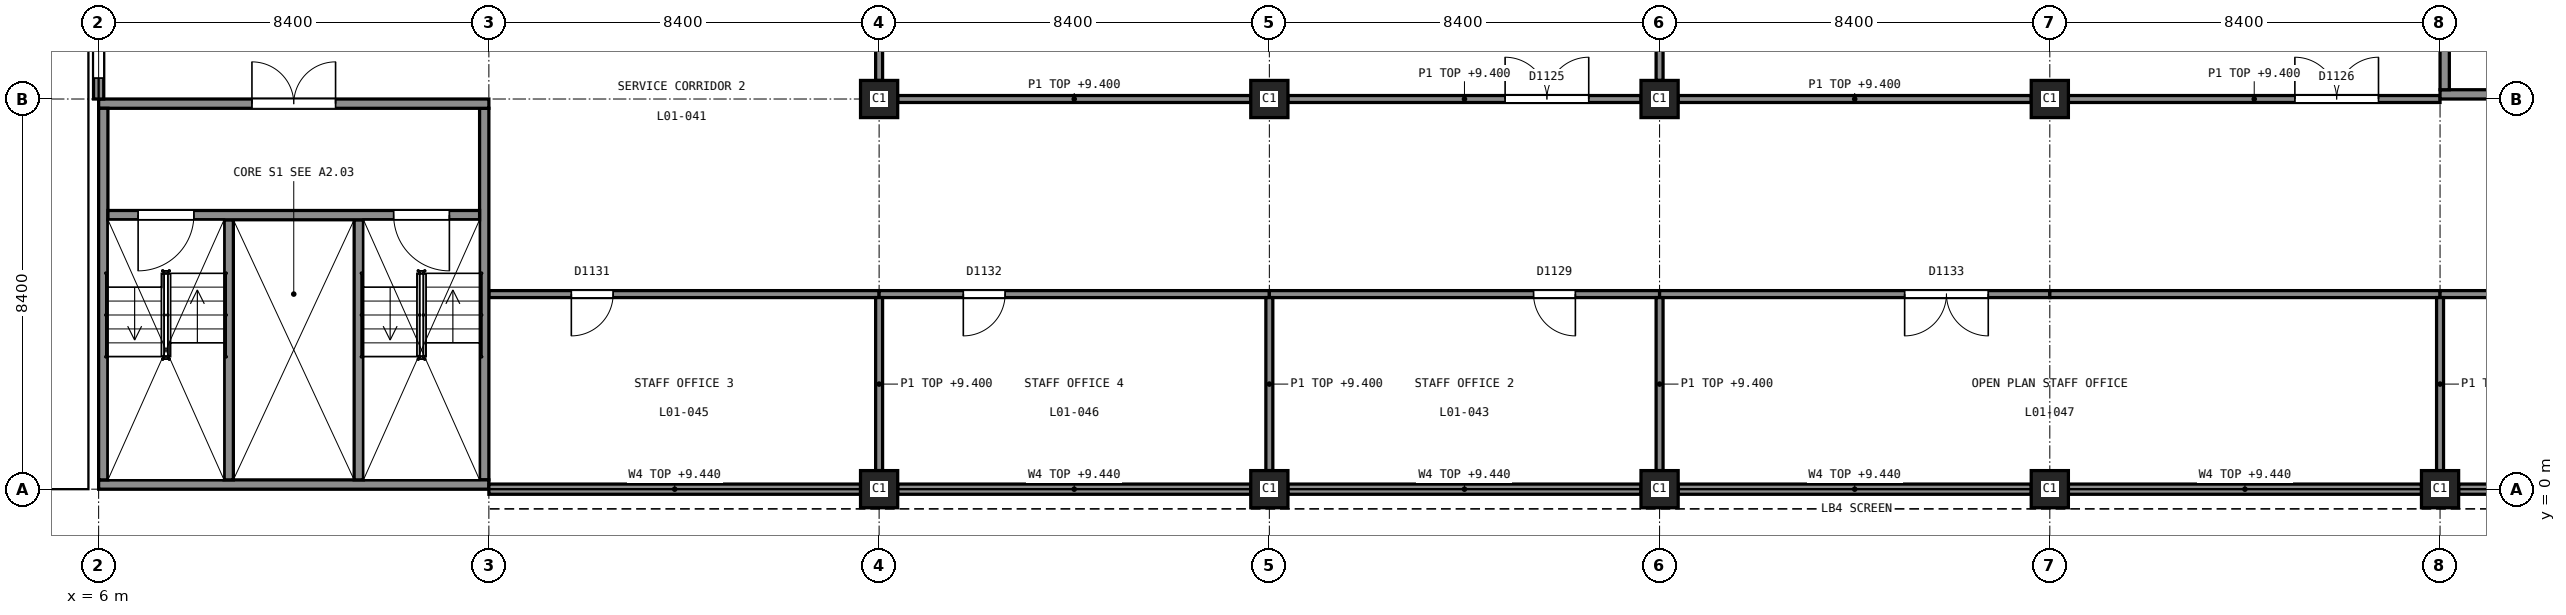
"""IFC4 building model, lengths in metres.
Left out: names, types, materials, properties, quantities, classifications, styles, units other than length and angle.
Written with IfcOpenShell. Run it as: python <this file> out.ifc"""

import sys

from ifc_helpers import new_model, si_unit, direction, frame, frame_2d, origin, origin_2d, place, context, subcontext, project, spatial, rectangle, extrude, element, fill, save


model = new_model("IFC4")
c1 = context("Model", 3, precision=1e-05, world=origin(), true_north=direction((0.0, 1.0)))
c2 = subcontext(c1, "Body", "Model", "MODEL_VIEW")
j1 = project(units=[si_unit("LENGTHUNIT", "METRE"), si_unit("PLANEANGLEUNIT", "RADIAN")], contexts=[c1])
p1 = place(None, origin())
s1 = spatial("IfcSite", under=j1, at=p1, CompositionType="ELEMENT")
p2 = place(p1, origin())
s2 = spatial("IfcBuilding", under=s1, at=p2, CompositionType="ELEMENT")
p3 = place(p2, frame((0.0, 0.0, 5.5)))
s3 = spatial("IfcBuildingStorey", under=s2, at=p3, CompositionType="ELEMENT", Elevation=5.5)
p4 = place(p3, frame((6.0, 0.1, 0.0), z_axis=(0.0, 0.0, 1.0), x_axis=(1.0, 0.0, 0.0)))
e1 = element("IfcWall", 1, at=p4, inside=s3, PredefinedType="SHEAR", context=c2, shape_type="SweptSolid", body=[
    extrude(rectangle(XDim=8.4, YDim=0.2, at=frame_2d((4.2, 0.0))), origin(), (0.0, 0.0, 1.0), 5.0),
])
p5 = place(p3, frame((6.0, 8.3, 0.0), z_axis=(0.0, 0.0, 1.0), x_axis=(1.0, 0.0, 0.0)))
e2 = element("IfcWall", 2, at=p5, inside=s3, PredefinedType="SHEAR", context=c2, shape_type="SweptSolid", body=[
    extrude(rectangle(XDim=8.4, YDim=0.2, at=frame_2d((4.2, 0.0))), origin(), (0.0, 0.0, 1.0), 5.0),
])
p6 = place(p5, frame((3.3, 0.0, 0.0)))
e3 = element("IfcOpeningElement", 3, at=p6, cuts=e2, PredefinedType="OPENING", context=c2, shape_type="SweptSolid", body=[
    extrude(rectangle(XDim=1.8, YDim=2.1, at=frame_2d((0.9, 1.05))), frame((0.0, 0.11, 0.0), z_axis=(0.0, -1.0, 0.0), x_axis=(1.0, 0.0, 0.0)), (0.0, 0.0, 1.0), 0.22),
])
for number, where, z_axis, x_axis in (
    (4, (6.1, 0.2, 0.0), (0.0, 0.0, 1.0), (0.0, 1.0, 0.0)),
    (5, (14.3, 0.2, 0.0), (0.0, 0.0, 1.0), (0.0, 1.0, 0.0)),
):
    element("IfcWall", number, at=place(p3, frame(where, z_axis=z_axis, x_axis=x_axis)), inside=s3, PredefinedType="SHEAR", context=c2, shape_type="SweptSolid", body=[
        extrude(rectangle(XDim=8.0, YDim=0.2, at=frame_2d((4.0, 0.0))), origin(), (0.0, 0.0, 1.0), 5.0),
    ])
p7 = place(p3, frame((6.2, 5.9, 0.0), z_axis=(0.0, 0.0, 1.0), x_axis=(1.0, 0.0, 0.0)))
e6 = element("IfcWall", 6, at=p7, inside=s3, PredefinedType="SHEAR", context=c2, shape_type="SweptSolid", body=[
    extrude(rectangle(XDim=8.0, YDim=0.2, at=frame_2d((4.0, 0.0))), origin(), (0.0, 0.0, 1.0), 5.0),
])
p8 = place(p7, frame((0.65, 0.0, 0.0)))
e7 = element("IfcOpeningElement", 7, at=p8, cuts=e6, PredefinedType="OPENING", context=c2, shape_type="SweptSolid", body=[
    extrude(rectangle(XDim=1.2, YDim=2.1, at=frame_2d((0.6, 1.05))), frame((0.0, 0.11, 0.0), z_axis=(0.0, -1.0, 0.0), x_axis=(1.0, 0.0, 0.0)), (0.0, 0.0, 1.0), 0.22),
])
p9 = place(p7, frame((6.15, 0.0, 0.0)))
e8 = element("IfcOpeningElement", 8, at=p9, cuts=e6, PredefinedType="OPENING", context=c2, shape_type="SweptSolid", body=[
    extrude(rectangle(XDim=1.2, YDim=2.1, at=frame_2d((0.6, 1.05))), frame((0.0, 0.11, 0.0), z_axis=(0.0, -1.0, 0.0), x_axis=(1.0, 0.0, 0.0)), (0.0, 0.0, 1.0), 0.22),
])
for number, where, z_axis, x_axis in (
    (9, (8.8, 0.2, 0.0), (0.0, 0.0, 1.0), (0.0, 1.0, 0.0)),
    (10, (11.6, 0.2, 0.0), (0.0, 0.0, 1.0), (0.0, 1.0, 0.0)),
):
    element("IfcWall", number, at=place(p3, frame(where, z_axis=z_axis, x_axis=x_axis)), inside=s3, PredefinedType="SHEAR", context=c2, shape_type="SweptSolid", body=[
        extrude(rectangle(XDim=5.6, YDim=0.2, at=frame_2d((2.8, 0.0))), origin(), (0.0, 0.0, 1.0), 5.0),
    ])
p10 = place(p3, frame((56.4, 8.5, 0.0), z_axis=(0.0, 0.0, 1.0), x_axis=(1.0, 0.0, 0.0)))
e11 = element("IfcWall", 11, at=p10, inside=s3, PredefinedType="SHEAR", context=c2, shape_type="SweptSolid", body=[
    extrude(rectangle(XDim=8.4, YDim=0.2, at=frame_2d((4.2, 0.0))), origin(), (0.0, 0.0, 1.0), 5.0),
])
p11 = place(p10, frame((3.3, 0.0, 0.0)))
e12 = element("IfcOpeningElement", 12, at=p11, cuts=e11, PredefinedType="OPENING", context=c2, shape_type="SweptSolid", body=[
    extrude(rectangle(XDim=1.8, YDim=2.1, at=frame_2d((0.9, 1.05))), frame((0.0, 0.11, 0.0), z_axis=(0.0, -1.0, 0.0), x_axis=(1.0, 0.0, 0.0)), (0.0, 0.0, 1.0), 0.22),
])
p12 = place(p3, frame((56.5, 8.6, 0.0), z_axis=(0.0, 0.0, 1.0), x_axis=(0.0, 1.0, 0.0)))
e13 = element("IfcWall", 13, at=p12, inside=s3, PredefinedType="SHEAR", context=c2, shape_type="SweptSolid", body=[
    extrude(rectangle(XDim=8.0, YDim=0.2, at=frame_2d((4.0, 0.0))), origin(), (0.0, 0.0, 1.0), 5.0),
])
for number, where, z_axis, x_axis in (
    (14, (22.8, 0.0, 0.0), (0.0, 0.0, 1.0), (1.0, 0.0, 0.0)),
    (15, (22.8, 8.4, 0.0), (0.0, 0.0, 1.0), (1.0, 0.0, 0.0)),
    (16, (31.2, 0.0, 0.0), (0.0, 0.0, 1.0), (1.0, 0.0, 0.0)),
    (17, (31.2, 8.4, 0.0), (0.0, 0.0, 1.0), (1.0, 0.0, 0.0)),
    (18, (39.6, 0.0, 0.0), (0.0, 0.0, 1.0), (1.0, 0.0, 0.0)),
    (19, (39.6, 8.4, 0.0), (0.0, 0.0, 1.0), (1.0, 0.0, 0.0)),
    (20, (48.0, 0.0, 0.0), (0.0, 0.0, 1.0), (1.0, 0.0, 0.0)),
    (21, (48.0, 8.4, 0.0), (0.0, 0.0, 1.0), (1.0, 0.0, 0.0)),
    (22, (56.4, 0.0, 0.0), (0.0, 0.0, 1.0), (1.0, 0.0, 0.0)),
):
    element("IfcColumn", number, at=place(p3, frame(where, z_axis=z_axis, x_axis=x_axis)), inside=s3, PredefinedType="COLUMN", context=c2, shape_type="SweptSolid", body=[
        extrude(rectangle(XDim=0.8, YDim=0.8, at=origin_2d()), origin(), (0.0, 0.0, 1.0), 5.0),
    ])
p13 = place(p3, frame((14.4, 0.0, 0.0), z_axis=(0.0, 0.0, 1.0), x_axis=(1.0, 0.0, 0.0)))
e23 = element("IfcWall", 23, at=p13, inside=s3, PredefinedType="SOLIDWALL", context=c2, shape_type="SweptSolid", body=[
    extrude(rectangle(XDim=8.0, YDim=0.22, at=frame_2d((4.0, 0.0))), origin(), (0.0, 0.0, 1.0), 3.94),
])
p14 = place(p3, frame((23.2, 0.0, 0.0), z_axis=(0.0, 0.0, 1.0), x_axis=(1.0, 0.0, 0.0)))
e24 = element("IfcWall", 24, at=p14, inside=s3, PredefinedType="SOLIDWALL", context=c2, shape_type="SweptSolid", body=[
    extrude(rectangle(XDim=7.6, YDim=0.22, at=frame_2d((3.8, 0.0))), origin(), (0.0, 0.0, 1.0), 3.94),
])
p15 = place(p3, frame((31.6, 0.0, 0.0), z_axis=(0.0, 0.0, 1.0), x_axis=(1.0, 0.0, 0.0)))
e25 = element("IfcWall", 25, at=p15, inside=s3, PredefinedType="SOLIDWALL", context=c2, shape_type="SweptSolid", body=[
    extrude(rectangle(XDim=7.6, YDim=0.22, at=frame_2d((3.8, 0.0))), origin(), (0.0, 0.0, 1.0), 3.94),
])
for number, where, z_axis, x_axis in (
    (26, (40.0, 0.0, 0.0), (0.0, 0.0, 1.0), (1.0, 0.0, 0.0)),
    (27, (48.4, 0.0, 0.0), (0.0, 0.0, 1.0), (1.0, 0.0, 0.0)),
):
    element("IfcWall", number, at=place(p3, frame(where, z_axis=z_axis, x_axis=x_axis)), inside=s3, PredefinedType="SOLIDWALL", context=c2, shape_type="SweptSolid", body=[
        extrude(rectangle(XDim=7.6, YDim=0.22, at=frame_2d((3.8, 0.0))), origin(), (0.0, 0.0, 1.0), 3.94),
    ])
p16 = place(p3, frame((56.8, 0.0, 0.0), z_axis=(0.0, 0.0, 1.0), x_axis=(1.0, 0.0, 0.0)))
e28 = element("IfcWall", 28, at=p16, inside=s3, PredefinedType="SOLIDWALL", context=c2, shape_type="SweptSolid", body=[
    extrude(rectangle(XDim=7.6, YDim=0.22, at=frame_2d((3.8, 0.0))), origin(), (0.0, 0.0, 1.0), 3.94),
])
p17 = place(p3, frame((6.0, 8.4, 0.0), z_axis=(0.0, 0.0, 1.0), x_axis=(0.0, 1.0, 0.0)))
e29 = element("IfcWall", 29, at=p17, inside=s3, PredefinedType="SOLIDWALL", context=c2, shape_type="SweptSolid", body=[
    extrude(rectangle(XDim=8.0, YDim=0.22, at=frame_2d((4.0, 0.0))), origin(), (0.0, 0.0, 1.0), 3.94),
])
p18 = place(p17, frame((0.45, 0.0, 0.9)))
e30 = element("IfcOpeningElement", 30, at=p18, cuts=e29, PredefinedType="OPENING", context=c2, shape_type="SweptSolid", body=[
    extrude(rectangle(XDim=3.6, YDim=1.5, at=frame_2d((1.8, 0.75))), frame((0.0, 0.12, 0.0), z_axis=(0.0, -1.0, 0.0), x_axis=(1.0, 0.0, 0.0)), (0.0, 0.0, 1.0), 0.24),
])
p19 = place(p3, frame((39.6, 8.8, 0.0), z_axis=(0.0, 0.0, 1.0), x_axis=(0.0, 1.0, 0.0)))
e31 = element("IfcWall", 31, at=p19, inside=s3, PredefinedType="PARTITIONING", context=c2, shape_type="SweptSolid", body=[
    extrude(rectangle(XDim=7.6, YDim=0.15, at=frame_2d((3.8, 0.0))), origin(), (0.0, 0.0, 1.0), 3.9),
])
p20 = place(p3, frame((23.2, 8.4, 0.0), z_axis=(0.0, 0.0, 1.0), x_axis=(1.0, 0.0, 0.0)))
e32 = element("IfcWall", 32, at=p20, inside=s3, PredefinedType="PARTITIONING", context=c2, shape_type="SweptSolid", body=[
    extrude(rectangle(XDim=7.6, YDim=0.15, at=frame_2d((3.8, 0.0))), origin(), (0.0, 0.0, 1.0), 3.9),
])
p21 = place(p3, frame((31.6, 8.4, 0.0), z_axis=(0.0, 0.0, 1.0), x_axis=(1.0, 0.0, 0.0)))
e33 = element("IfcWall", 33, at=p21, inside=s3, PredefinedType="PARTITIONING", context=c2, shape_type="SweptSolid", body=[
    extrude(rectangle(XDim=7.6, YDim=0.15, at=frame_2d((3.8, 0.0))), origin(), (0.0, 0.0, 1.0), 3.9),
])
p22 = place(p21, frame((4.675, 0.0, 0.0)))
e34 = element("IfcOpeningElement", 34, at=p22, cuts=e33, PredefinedType="OPENING", context=c2, shape_type="SweptSolid", body=[
    extrude(rectangle(XDim=1.8, YDim=2.1, at=frame_2d((0.9, 1.05))), frame((0.0, 0.085, 0.0), z_axis=(0.0, -1.0, 0.0), x_axis=(1.0, 0.0, 0.0)), (0.0, 0.0, 1.0), 0.17),
])
p23 = place(p3, frame((40.0, 8.4, 0.0), z_axis=(0.0, 0.0, 1.0), x_axis=(1.0, 0.0, 0.0)))
e35 = element("IfcWall", 35, at=p23, inside=s3, PredefinedType="PARTITIONING", context=c2, shape_type="SweptSolid", body=[
    extrude(rectangle(XDim=7.6, YDim=0.15, at=frame_2d((3.8, 0.0))), origin(), (0.0, 0.0, 1.0), 3.9),
])
p24 = place(p3, frame((48.4, 8.4, 0.0), z_axis=(0.0, 0.0, 1.0), x_axis=(1.0, 0.0, 0.0)))
e36 = element("IfcWall", 36, at=p24, inside=s3, PredefinedType="PARTITIONING", context=c2, shape_type="SweptSolid", body=[
    extrude(rectangle(XDim=8.0, YDim=0.15, at=frame_2d((4.0, 0.0))), origin(), (0.0, 0.0, 1.0), 3.9),
])
p25 = place(p24, frame((4.875, 0.0, 0.0)))
e37 = element("IfcOpeningElement", 37, at=p25, cuts=e36, PredefinedType="OPENING", context=c2, shape_type="SweptSolid", body=[
    extrude(rectangle(XDim=1.8, YDim=2.1, at=frame_2d((0.9, 1.05))), frame((0.0, 0.085, 0.0), z_axis=(0.0, -1.0, 0.0), x_axis=(1.0, 0.0, 0.0)), (0.0, 0.0, 1.0), 0.17),
])
p26 = place(p3, frame((22.8, 8.8, 0.0), z_axis=(0.0, 0.0, 1.0), x_axis=(0.0, 1.0, 0.0)))
e38 = element("IfcWall", 38, at=p26, inside=s3, PredefinedType="PARTITIONING", context=c2, shape_type="SweptSolid", body=[
    extrude(rectangle(XDim=3.7, YDim=0.15, at=frame_2d((1.85, 0.0))), origin(), (0.0, 0.0, 1.0), 3.9),
])
p27 = place(p3, frame((14.4, 4.2, 0.0), z_axis=(0.0, 0.0, 1.0), x_axis=(1.0, 0.0, 0.0)))
e39 = element("IfcWall", 39, at=p27, inside=s3, PredefinedType="PARTITIONING", context=c2, shape_type="SweptSolid", body=[
    extrude(rectangle(XDim=8.4, YDim=0.15, at=frame_2d((4.2, 0.0))), origin(), (0.0, 0.0, 1.0), 3.9),
])
p28 = place(p27, frame((1.775, 0.0, 0.0)))
e40 = element("IfcOpeningElement", 40, at=p28, cuts=e39, PredefinedType="OPENING", context=c2, shape_type="SweptSolid", body=[
    extrude(rectangle(XDim=0.9, YDim=2.1, at=frame_2d((0.45, 1.05))), frame((0.0, 0.085, 0.0), z_axis=(0.0, -1.0, 0.0), x_axis=(1.0, 0.0, 0.0)), (0.0, 0.0, 1.0), 0.17),
])
p29 = place(p3, frame((22.8, 4.2, 0.0), z_axis=(0.0, 0.0, 1.0), x_axis=(1.0, 0.0, 0.0)))
e41 = element("IfcWall", 41, at=p29, inside=s3, PredefinedType="PARTITIONING", context=c2, shape_type="SweptSolid", body=[
    extrude(rectangle(XDim=8.4, YDim=0.15, at=frame_2d((4.2, 0.0))), origin(), (0.0, 0.0, 1.0), 3.9),
])
p30 = place(p29, frame((1.812, 0.0, 0.0)))
e42 = element("IfcOpeningElement", 42, at=p30, cuts=e41, PredefinedType="OPENING", context=c2, shape_type="SweptSolid", body=[
    extrude(rectangle(XDim=0.9, YDim=2.1, at=frame_2d((0.45, 1.05))), frame((0.0, 0.085, 0.0), z_axis=(0.0, -1.0, 0.0), x_axis=(1.0, 0.0, 0.0)), (0.0, 0.0, 1.0), 0.17),
])
p31 = place(p3, frame((31.2, 4.2, 0.0), z_axis=(0.0, 0.0, 1.0), x_axis=(1.0, 0.0, 0.0)))
e43 = element("IfcWall", 43, at=p31, inside=s3, PredefinedType="PARTITIONING", context=c2, shape_type="SweptSolid", body=[
    extrude(rectangle(XDim=8.4, YDim=0.15, at=frame_2d((4.2, 0.0))), origin(), (0.0, 0.0, 1.0), 3.9),
])
p32 = place(p31, frame((5.688, 0.0, 0.0)))
e44 = element("IfcOpeningElement", 44, at=p32, cuts=e43, PredefinedType="OPENING", context=c2, shape_type="SweptSolid", body=[
    extrude(rectangle(XDim=0.9, YDim=2.1, at=frame_2d((0.45, 1.05))), frame((0.0, 0.085, 0.0), z_axis=(0.0, -1.0, 0.0), x_axis=(1.0, 0.0, 0.0)), (0.0, 0.0, 1.0), 0.17),
])
p33 = place(p3, frame((39.6, 4.2, 0.0), z_axis=(0.0, 0.0, 1.0), x_axis=(1.0, 0.0, 0.0)))
e45 = element("IfcWall", 45, at=p33, inside=s3, PredefinedType="PARTITIONING", context=c2, shape_type="SweptSolid", body=[
    extrude(rectangle(XDim=8.4, YDim=0.15, at=frame_2d((4.2, 0.0))), origin(), (0.0, 0.0, 1.0), 3.9),
])
p34 = place(p33, frame((5.275, 0.0, 0.0)))
e46 = element("IfcOpeningElement", 46, at=p34, cuts=e45, PredefinedType="OPENING", context=c2, shape_type="SweptSolid", body=[
    extrude(rectangle(XDim=1.8, YDim=2.1, at=frame_2d((0.9, 1.05))), frame((0.0, 0.085, 0.0), z_axis=(0.0, -1.0, 0.0), x_axis=(1.0, 0.0, 0.0)), (0.0, 0.0, 1.0), 0.17),
])
p35 = place(p3, frame((48.0, 4.2, 0.0), z_axis=(0.0, 0.0, 1.0), x_axis=(1.0, 0.0, 0.0)))
e47 = element("IfcWall", 47, at=p35, inside=s3, PredefinedType="PARTITIONING", context=c2, shape_type="SweptSolid", body=[
    extrude(rectangle(XDim=8.4, YDim=0.15, at=frame_2d((4.2, 0.0))), origin(), (0.0, 0.0, 1.0), 3.9),
])
p36 = place(p3, frame((56.4, 4.2, 0.0), z_axis=(0.0, 0.0, 1.0), x_axis=(1.0, 0.0, 0.0)))
e48 = element("IfcWall", 48, at=p36, inside=s3, PredefinedType="PARTITIONING", context=c2, shape_type="SweptSolid", body=[
    extrude(rectangle(XDim=8.4, YDim=0.15, at=frame_2d((4.2, 0.0))), origin(), (0.0, 0.0, 1.0), 3.9),
])
p37 = place(p36, frame((1.812, 0.0, 0.0)))
e49 = element("IfcOpeningElement", 49, at=p37, cuts=e48, PredefinedType="OPENING", context=c2, shape_type="SweptSolid", body=[
    extrude(rectangle(XDim=0.9, YDim=2.1, at=frame_2d((0.45, 1.05))), frame((0.0, 0.085, 0.0), z_axis=(0.0, -1.0, 0.0), x_axis=(1.0, 0.0, 0.0)), (0.0, 0.0, 1.0), 0.17),
])
for number, where, z_axis, x_axis in (
    (50, (31.2, 0.4, 0.0), (0.0, 0.0, 1.0), (0.0, 1.0, 0.0)),
    (51, (39.6, 0.4, 0.0), (0.0, 0.0, 1.0), (0.0, 1.0, 0.0)),
    (52, (56.4, 0.4, 0.0), (0.0, 0.0, 1.0), (0.0, 1.0, 0.0)),
    (53, (22.8, 0.4, 0.0), (0.0, 0.0, 1.0), (0.0, 1.0, 0.0)),
):
    element("IfcWall", number, at=place(p3, frame(where, z_axis=z_axis, x_axis=x_axis)), inside=s3, PredefinedType="PARTITIONING", context=c2, shape_type="SweptSolid", body=[
        extrude(rectangle(XDim=3.725, YDim=0.15, at=frame_2d((1.863, 0.0))), origin(), (0.0, 0.0, 1.0), 3.9),
    ])
p38 = place(p18, origin())
e54 = element("IfcWindow", 54, at=p38, inside=s3, PartitioningType="DOUBLE_PANEL_VERTICAL", PredefinedType="WINDOW", context=c2, shape_type="SweptSolid", body=[
    extrude(rectangle(XDim=3.6, YDim=1.5, at=frame_2d((1.8, 0.75))), frame((0.0, -0.03, 0.0), z_axis=(0.0, -1.0, 0.0), x_axis=(1.0, 0.0, 0.0)), (0.0, 0.0, 1.0), 0.06),
])
fill(e30, e54)
p39 = place(p22, origin())
e55 = element("IfcDoor", 55, at=p39, inside=s3, OperationType="DOUBLE_DOOR_SINGLE_SWING", PredefinedType="DOOR", context=c2, shape_type="SweptSolid", body=[
    extrude(rectangle(XDim=1.8, YDim=2.1, at=frame_2d((0.9, 1.05))), frame((0.0, 0.025, 0.0), z_axis=(0.0, -1.0, 0.0), x_axis=(1.0, 0.0, 0.0)), (0.0, 0.0, 1.0), 0.05),
])
fill(e34, e55)
p40 = place(p25, origin())
e56 = element("IfcDoor", 56, at=p40, inside=s3, OperationType="DOUBLE_DOOR_SINGLE_SWING", PredefinedType="DOOR", context=c2, shape_type="SweptSolid", body=[
    extrude(rectangle(XDim=1.8, YDim=2.1, at=frame_2d((0.9, 1.05))), frame((0.0, 0.025, 0.0), z_axis=(0.0, -1.0, 0.0), x_axis=(1.0, 0.0, 0.0)), (0.0, 0.0, 1.0), 0.05),
])
fill(e37, e56)
p41 = place(p32, origin())
e57 = element("IfcDoor", 57, at=p41, inside=s3, OperationType="SINGLE_SWING_RIGHT", PredefinedType="DOOR", context=c2, shape_type="SweptSolid", body=[
    extrude(rectangle(XDim=0.9, YDim=2.1, at=frame_2d((0.45, 1.05))), frame((0.0, 0.025, 0.0), z_axis=(0.0, -1.0, 0.0), x_axis=(1.0, 0.0, 0.0)), (0.0, 0.0, 1.0), 0.05),
])
fill(e44, e57)
p42 = place(p28, origin())
e58 = element("IfcDoor", 58, at=p42, inside=s3, OperationType="SINGLE_SWING_LEFT", PredefinedType="DOOR", context=c2, shape_type="SweptSolid", body=[
    extrude(rectangle(XDim=0.9, YDim=2.1, at=frame_2d((0.45, 1.05))), frame((0.0, 0.025, 0.0), z_axis=(0.0, -1.0, 0.0), x_axis=(1.0, 0.0, 0.0)), (0.0, 0.0, 1.0), 0.05),
])
fill(e40, e58)
p43 = place(p30, origin())
e59 = element("IfcDoor", 59, at=p43, inside=s3, OperationType="SINGLE_SWING_LEFT", PredefinedType="DOOR", context=c2, shape_type="SweptSolid", body=[
    extrude(rectangle(XDim=0.9, YDim=2.1, at=frame_2d((0.45, 1.05))), frame((0.0, 0.025, 0.0), z_axis=(0.0, -1.0, 0.0), x_axis=(1.0, 0.0, 0.0)), (0.0, 0.0, 1.0), 0.05),
])
fill(e42, e59)
p44 = place(p34, origin())
e60 = element("IfcDoor", 60, at=p44, inside=s3, OperationType="DOUBLE_DOOR_SINGLE_SWING", PredefinedType="DOOR", context=c2, shape_type="SweptSolid", body=[
    extrude(rectangle(XDim=1.8, YDim=2.1, at=frame_2d((0.9, 1.05))), frame((0.0, 0.025, 0.0), z_axis=(0.0, -1.0, 0.0), x_axis=(1.0, 0.0, 0.0)), (0.0, 0.0, 1.0), 0.05),
])
fill(e46, e60)
p45 = place(p6, origin())
e61 = element("IfcDoor", 61, at=p45, inside=s3, OperationType="DOUBLE_DOOR_SINGLE_SWING", PredefinedType="DOOR", context=c2, shape_type="SweptSolid", body=[
    extrude(rectangle(XDim=1.8, YDim=2.1, at=frame_2d((0.9, 1.05))), frame((0.0, 0.025, 0.0), z_axis=(0.0, -1.0, 0.0), x_axis=(1.0, 0.0, 0.0)), (0.0, 0.0, 1.0), 0.05),
])
fill(e3, e61)
p46 = place(p8, origin())
e62 = element("IfcDoor", 62, at=p46, inside=s3, OperationType="SINGLE_SWING_LEFT", PredefinedType="DOOR", context=c2, shape_type="SweptSolid", body=[
    extrude(rectangle(XDim=1.2, YDim=2.1, at=frame_2d((0.6, 1.05))), frame((0.0, 0.025, 0.0), z_axis=(0.0, -1.0, 0.0), x_axis=(1.0, 0.0, 0.0)), (0.0, 0.0, 1.0), 0.05),
])
fill(e7, e62)
p47 = place(p9, origin())
e63 = element("IfcDoor", 63, at=p47, inside=s3, OperationType="SINGLE_SWING_RIGHT", PredefinedType="DOOR", context=c2, shape_type="SweptSolid", body=[
    extrude(rectangle(XDim=1.2, YDim=2.1, at=frame_2d((0.6, 1.05))), frame((0.0, 0.025, 0.0), z_axis=(0.0, -1.0, 0.0), x_axis=(1.0, 0.0, 0.0)), (0.0, 0.0, 1.0), 0.05),
])
fill(e8, e63)
save(model, sys.argv[1])
